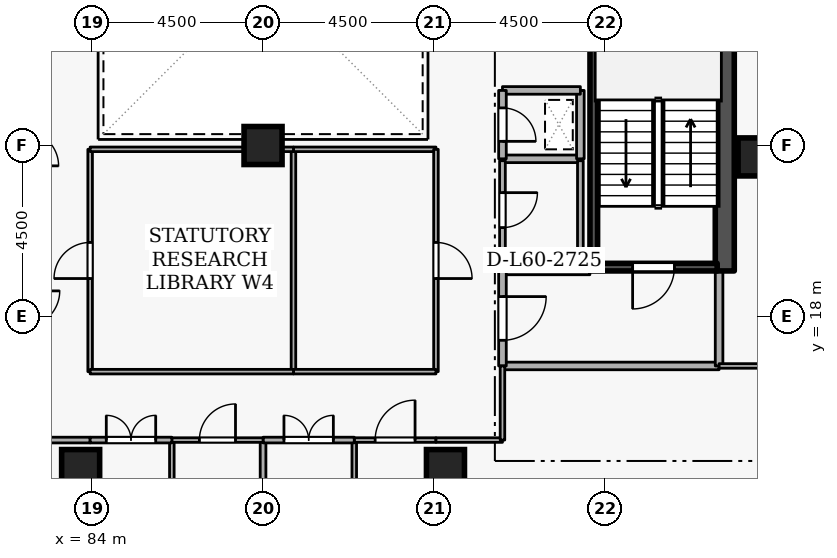
"""IFC4 building model, lengths in metres.
Left out: names, types, materials, properties, quantities, classifications, styles, units other than length and angle.
Written with IfcOpenShell. Run it as: python <this file> out.ifc"""

import sys

from ifc_helpers import new_model, si_unit, direction, frame, frame_2d, origin, origin_2d, place, context, subcontext, project, spatial, rectangle, extrude, element, fill, save


model = new_model("IFC4")
c1 = context("Model", 3, precision=1e-05, world=origin(), true_north=direction((0.0, 1.0)))
c2 = subcontext(c1, "Body", "Model", "MODEL_VIEW")
j1 = project(units=[si_unit("LENGTHUNIT", "METRE"), si_unit("PLANEANGLEUNIT", "RADIAN")], contexts=[c1])
p1 = place(None, origin())
s1 = spatial("IfcSite", under=j1, at=p1, CompositionType="ELEMENT")
p2 = place(p1, origin())
s2 = spatial("IfcBuilding", under=s1, at=p2, CompositionType="ELEMENT")
p3 = place(p2, frame((0.0, 0.0, 225.9)))
s3 = spatial("IfcBuildingStorey", under=s2, at=p3, CompositionType="ELEMENT", Elevation=225.9)
p4 = place(p3, frame((100.65, 19.2, 0.0), z_axis=(0.0, 0.0, 1.0), x_axis=(0.0, 1.0, 0.0)))
e1 = element("IfcWall", 1, at=p4, inside=s3, PredefinedType="SHEAR", context=c2, shape_type="SweptSolid", body=[
    extrude(rectangle(XDim=15.6, YDim=0.5, at=frame_2d((7.8, 0.0))), origin(), (0.0, 0.0, 1.0), 3.6),
])
for number, where, z_axis, x_axis in (
    (2, (93.3, 14.0, 0.0), (0.0, 0.0, 1.0), (1.0, 0.0, 0.0)),
    (3, (83.7, 14.0, 0.0), (0.0, 0.0, 1.0), (1.0, 0.0, 0.0)),
    (4, (101.5, 22.2, 0.0), (0.0, 0.0, 1.0), (1.0, 0.0, 0.0)),
    (5, (88.5, 22.5, 0.0), (0.0, 0.0, 1.0), (1.0, 0.0, 0.0)),
):
    element("IfcColumn", number, at=place(p3, frame(where, z_axis=z_axis, x_axis=x_axis)), inside=s3, PredefinedType="COLUMN", context=c2, shape_type="SweptSolid", body=[
        extrude(rectangle(XDim=1.0, YDim=1.0, at=origin_2d()), origin(), (0.0, 0.0, 1.0), 3.6),
    ])
p5 = place(p3, frame((100.45, 19.3, 0.0), z_axis=(0.0, 0.0, 1.0), x_axis=(-1.0, 0.0, 0.0)))
e6 = element("IfcWall", 6, at=p5, inside=s3, PredefinedType="SHEAR", context=c2, shape_type="SweptSolid", body=[
    extrude(rectangle(XDim=3.35, YDim=0.2, at=frame_2d((1.675, 0.0))), origin(), (0.0, 0.0, 1.0), 3.6),
])
p6 = place(p5, frame((1.125, 0.0, 0.0)))
e7 = element("IfcOpeningElement", 7, at=p6, cuts=e6, PredefinedType="OPENING", context=c2, shape_type="SweptSolid", body=[
    extrude(rectangle(XDim=1.1, YDim=2.1, at=frame_2d((0.55, 1.05))), frame((0.0, 0.11, 0.0), z_axis=(0.0, -1.0, 0.0), x_axis=(1.0, 0.0, 0.0)), (0.0, 0.0, 1.0), 0.22),
])
p7 = place(p3, frame((97.203, 26.55, 0.0), z_axis=(0.0, 0.0, 1.0), x_axis=(0.0, -1.0, 0.0)))
e8 = element("IfcWall", 8, at=p7, inside=s3, PredefinedType="SHEAR", context=c2, shape_type="SweptSolid", body=[
    extrude(rectangle(XDim=7.1, YDim=0.2, at=frame_2d((3.55, 0.0))), origin(), (0.0, 0.0, 1.0), 3.6),
])
p8 = place(p3, frame((94.8, 16.7, 0.0), z_axis=(0.0, 0.0, 1.0), x_axis=(1.0, 0.0, 0.0)))
e9 = element("IfcWall", 9, at=p8, inside=s3, PredefinedType="STANDARD", context=c2, shape_type="SweptSolid", body=[
    extrude(rectangle(XDim=5.7, YDim=0.2, at=frame_2d((2.85, 0.0))), origin(), (0.0, 0.0, 1.0), 3.3),
])
p9 = place(p3, frame((100.5, 16.7, 0.0), z_axis=(0.0, 0.0, 1.0), x_axis=(0.0, 1.0, 0.0)))
e10 = element("IfcWall", 10, at=p9, inside=s3, PredefinedType="STANDARD", context=c2, shape_type="SweptSolid", body=[
    extrude(rectangle(XDim=2.5, YDim=0.2, at=frame_2d((1.25, 0.0))), origin(), (0.0, 0.0, 1.0), 3.3),
])
p10 = place(p3, frame((97.1, 19.2, 0.0), z_axis=(0.0, 0.0, 1.0), x_axis=(-1.0, 0.0, 0.0)))
e11 = element("IfcWall", 11, at=p10, inside=s3, PredefinedType="STANDARD", context=c2, shape_type="SweptSolid", body=[
    extrude(rectangle(XDim=2.3, YDim=0.2, at=frame_2d((1.15, 0.0))), origin(), (0.0, 0.0, 1.0), 2.505),
])
p11 = place(p3, frame((94.8, 19.2, 0.0), z_axis=(0.0, 0.0, 1.0), x_axis=(0.0, -1.0, 0.0)))
e12 = element("IfcWall", 12, at=p11, inside=s3, PredefinedType="STANDARD", context=c2, shape_type="SweptSolid", body=[
    extrude(rectangle(XDim=2.5, YDim=0.2, at=frame_2d((1.25, 0.0))), origin(), (0.0, 0.0, 1.0), 3.3),
])
p12 = place(p11, frame((0.675, 0.0, 0.0)))
e13 = element("IfcOpeningElement", 13, at=p12, cuts=e12, PredefinedType="OPENING", context=c2, shape_type="SweptSolid", body=[
    extrude(rectangle(XDim=1.15, YDim=2.1, at=frame_2d((0.575, 1.05))), frame((0.0, 0.11, 0.0), z_axis=(0.0, -1.0, 0.0), x_axis=(1.0, 0.0, 0.0)), (0.0, 0.0, 1.0), 0.22),
])
p13 = place(p3, frame((94.8, 22.15, 0.0), z_axis=(0.0, 0.0, 1.0), x_axis=(1.0, 0.0, 0.0)))
e14 = element("IfcWall", 14, at=p13, inside=s3, PredefinedType="STANDARD", context=c2, shape_type="SweptSolid", body=[
    extrude(rectangle(XDim=2.05, YDim=0.2, at=frame_2d((1.025, 0.0))), origin(), (0.0, 0.0, 1.0), 3.3),
])
p14 = place(p3, frame((96.85, 22.15, 0.0), z_axis=(0.0, 0.0, 1.0), x_axis=(0.0, 1.0, 0.0)))
e15 = element("IfcWall", 15, at=p14, inside=s3, PredefinedType="STANDARD", context=c2, shape_type="SweptSolid", body=[
    extrude(rectangle(XDim=1.8, YDim=0.2, at=frame_2d((0.9, 0.0))), origin(), (0.0, 0.0, 1.0), 3.3),
])
p15 = place(p3, frame((96.85, 23.95, 0.0), z_axis=(0.0, 0.0, 1.0), x_axis=(-1.0, 0.0, 0.0)))
e16 = element("IfcWall", 16, at=p15, inside=s3, PredefinedType="STANDARD", context=c2, shape_type="SweptSolid", body=[
    extrude(rectangle(XDim=2.05, YDim=0.2, at=frame_2d((1.025, 0.0))), origin(), (0.0, 0.0, 1.0), 3.3),
])
p16 = place(p3, frame((94.8, 23.95, 0.0), z_axis=(0.0, 0.0, 1.0), x_axis=(0.0, -1.0, 0.0)))
e17 = element("IfcWall", 17, at=p16, inside=s3, PredefinedType="STANDARD", context=c2, shape_type="SweptSolid", body=[
    extrude(rectangle(XDim=1.8, YDim=0.2, at=frame_2d((0.9, 0.0))), origin(), (0.0, 0.0, 1.0), 3.3),
])
p17 = place(p16, frame((0.46, 0.0, 0.0)))
e18 = element("IfcOpeningElement", 18, at=p17, cuts=e17, PredefinedType="OPENING", context=c2, shape_type="SweptSolid", body=[
    extrude(rectangle(XDim=0.88, YDim=2.04, at=frame_2d((0.44, 1.02))), frame((0.0, 0.11, 0.0), z_axis=(0.0, -1.0, 0.0), x_axis=(1.0, 0.0, 0.0)), (0.0, 0.0, 1.0), 0.22),
])
p18 = place(p3, frame((94.8, 19.5, 0.0), z_axis=(0.0, 0.0, 1.0), x_axis=(1.0, 0.0, 0.0)))
e19 = element("IfcWall", 19, at=p18, inside=s3, PredefinedType="PARTITIONING", context=c2, shape_type="SweptSolid", body=[
    extrude(rectangle(XDim=2.05, YDim=0.15, at=frame_2d((1.025, 0.0))), origin(), (0.0, 0.0, 1.0), 2.505),
])
p19 = place(p3, frame((96.85, 19.5, 0.0), z_axis=(0.0, 0.0, 1.0), x_axis=(0.0, 1.0, 0.0)))
e20 = element("IfcWall", 20, at=p19, inside=s3, PredefinedType="PARTITIONING", context=c2, shape_type="SweptSolid", body=[
    extrude(rectangle(XDim=2.6, YDim=0.15, at=frame_2d((1.3, 0.0))), origin(), (0.0, 0.0, 1.0), 3.3),
])
p20 = place(p3, frame((94.8, 22.1, 0.0), z_axis=(0.0, 0.0, 1.0), x_axis=(0.0, -1.0, 0.0)))
e21 = element("IfcWall", 21, at=p20, inside=s3, PredefinedType="PARTITIONING", context=c2, shape_type="SweptSolid", body=[
    extrude(rectangle(XDim=2.6, YDim=0.15, at=frame_2d((1.3, 0.0))), origin(), (0.0, 0.0, 1.0), 3.3),
])
p21 = place(p20, frame((0.84, 0.0, 0.0)))
e22 = element("IfcOpeningElement", 22, at=p21, cuts=e21, PredefinedType="OPENING", context=c2, shape_type="SweptSolid", body=[
    extrude(rectangle(XDim=0.92, YDim=2.08, at=frame_2d((0.46, 1.04))), frame((0.0, 0.085, 0.0), z_axis=(0.0, -1.0, 0.0), x_axis=(1.0, 0.0, 0.0)), (0.0, 0.0, 1.0), 0.17),
])
p22 = place(p3, frame((90.9, 3.28, 0.0), z_axis=(0.0, 0.0, 1.0), x_axis=(0.0, 1.0, 0.0)))
e23 = element("IfcWall", 23, at=p22, inside=s3, PredefinedType="PARTITIONING", context=c2, shape_type="SweptSolid", body=[
    extrude(rectangle(XDim=11.47, YDim=0.12, at=frame_2d((5.735, 0.0))), origin(), (0.0, 0.0, 1.0), 3.3),
])
p23 = place(p3, frame((90.9, 14.75, 0.0), z_axis=(0.0, 0.0, 1.0), x_axis=(1.0, 0.0, 0.0)))
e24 = element("IfcWall", 24, at=p23, inside=s3, PredefinedType="PARTITIONING", context=c2, shape_type="SweptSolid", body=[
    extrude(rectangle(XDim=2.15, YDim=0.12, at=frame_2d((1.075, 0.0))), origin(), (0.0, 0.0, 1.0), 3.3),
])
p24 = place(p23, frame((0.55, 0.0, 0.0)))
e25 = element("IfcOpeningElement", 25, at=p24, cuts=e24, PredefinedType="OPENING", context=c2, shape_type="SweptSolid", body=[
    extrude(rectangle(XDim=1.05, YDim=2.1, at=frame_2d((0.525, 1.05))), frame((0.0, 0.07, 0.0), z_axis=(0.0, -1.0, 0.0), x_axis=(1.0, 0.0, 0.0)), (0.0, 0.0, 1.0), 0.14),
])
p25 = place(p3, frame((93.05, 14.75, 0.0), z_axis=(0.0, 0.0, 1.0), x_axis=(1.0, 0.0, 0.0)))
e26 = element("IfcWall", 26, at=p25, inside=s3, PredefinedType="PARTITIONING", context=c2, shape_type="SweptSolid", body=[
    extrude(rectangle(XDim=1.75, YDim=0.12, at=frame_2d((0.875, 0.0))), origin(), (0.0, 0.0, 1.0), 3.3),
])
p26 = place(p3, frame((94.8, 14.75, 0.0), z_axis=(0.0, 0.0, 1.0), x_axis=(0.0, 1.0, 0.0)))
e27 = element("IfcWall", 27, at=p26, inside=s3, PredefinedType="PARTITIONING", context=c2, shape_type="SweptSolid", body=[
    extrude(rectangle(XDim=1.95, YDim=0.12, at=frame_2d((0.975, 0.0))), origin(), (0.0, 0.0, 1.0), 3.3),
])
p27 = place(p3, frame((100.5, 16.7, 0.0), z_axis=(0.0, 0.0, 1.0), x_axis=(1.0, 0.0, 0.0)))
e28 = element("IfcWall", 28, at=p27, inside=s3, PredefinedType="PARTITIONING", context=c2, shape_type="SweptSolid", body=[
    extrude(rectangle(XDim=5.72, YDim=0.12, at=frame_2d((2.86, 0.0))), origin(), (0.0, 0.0, 1.0), 3.3),
])
p28 = place(p3, frame((88.5, 7.329, 0.0), z_axis=(0.0, 0.0, 1.0), x_axis=(0.0, 1.0, 0.0)))
e29 = element("IfcWall", 29, at=p28, inside=s3, PredefinedType="PARTITIONING", context=c2, shape_type="SweptSolid", body=[
    extrude(rectangle(XDim=7.421, YDim=0.15, at=frame_2d((3.711, 0.0))), origin(), (0.0, 0.0, 1.0), 1.785),
])
p29 = place(p3, frame((88.5, 14.75, 0.0), z_axis=(0.0, 0.0, 1.0), x_axis=(1.0, 0.0, 0.0)))
e30 = element("IfcWall", 30, at=p29, inside=s3, PredefinedType="PARTITIONING", context=c2, shape_type="SweptSolid", body=[
    extrude(rectangle(XDim=2.4, YDim=0.15, at=frame_2d((1.2, 0.0))), origin(), (0.0, 0.0, 1.0), 3.3),
])
p30 = place(p29, frame((0.55, 0.0, 0.0)))
e31 = element("IfcOpeningElement", 31, at=p30, cuts=e30, PredefinedType="OPENING", context=c2, shape_type="SweptSolid", body=[
    extrude(rectangle(XDim=1.3, YDim=2.12, at=frame_2d((0.65, 1.06))), frame((0.0, 0.085, 0.0), z_axis=(0.0, -1.0, 0.0), x_axis=(1.0, 0.0, 0.0)), (0.0, 0.0, 1.0), 0.17),
])
p31 = place(p3, frame((86.1, 3.28, 0.0), z_axis=(0.0, 0.0, 1.0), x_axis=(0.0, 1.0, 0.0)))
e32 = element("IfcWall", 32, at=p31, inside=s3, PredefinedType="PARTITIONING", context=c2, shape_type="SweptSolid", body=[
    extrude(rectangle(XDim=11.47, YDim=0.12, at=frame_2d((5.735, 0.0))), origin(), (0.0, 0.0, 1.0), 3.3),
])
p32 = place(p3, frame((86.1, 14.75, 0.0), z_axis=(0.0, 0.0, 1.0), x_axis=(1.0, 0.0, 0.0)))
e33 = element("IfcWall", 33, at=p32, inside=s3, PredefinedType="PARTITIONING", context=c2, shape_type="SweptSolid", body=[
    extrude(rectangle(XDim=2.4, YDim=0.12, at=frame_2d((1.2, 0.0))), origin(), (0.0, 0.0, 1.0), 3.3),
])
p33 = place(p32, frame((0.725, 0.0, 0.0)))
e34 = element("IfcOpeningElement", 34, at=p33, cuts=e33, PredefinedType="OPENING", context=c2, shape_type="SweptSolid", body=[
    extrude(rectangle(XDim=0.95, YDim=2.1, at=frame_2d((0.475, 1.05))), frame((0.0, 0.07, 0.0), z_axis=(0.0, -1.0, 0.0), x_axis=(1.0, 0.0, 0.0)), (0.0, 0.0, 1.0), 0.14),
])
p34 = place(p3, frame((82.2, 14.75, 0.0), z_axis=(0.0, 0.0, 1.0), x_axis=(1.0, 0.0, 0.0)))
e35 = element("IfcWall", 35, at=p34, inside=s3, PredefinedType="PARTITIONING", context=c2, shape_type="SweptSolid", body=[
    extrude(rectangle(XDim=1.75, YDim=0.15, at=frame_2d((0.875, 0.0))), origin(), (0.0, 0.0, 1.0), 3.3),
])
p35 = place(p3, frame((83.95, 14.75, 0.0), z_axis=(0.0, 0.0, 1.0), x_axis=(1.0, 0.0, 0.0)))
e36 = element("IfcWall", 36, at=p35, inside=s3, PredefinedType="PARTITIONING", context=c2, shape_type="SweptSolid", body=[
    extrude(rectangle(XDim=2.15, YDim=0.15, at=frame_2d((1.075, 0.0))), origin(), (0.0, 0.0, 1.0), 3.3),
])
p36 = place(p35, frame((0.425, 0.0, 0.0)))
e37 = element("IfcOpeningElement", 37, at=p36, cuts=e36, PredefinedType="OPENING", context=c2, shape_type="SweptSolid", body=[
    extrude(rectangle(XDim=1.3, YDim=2.12, at=frame_2d((0.65, 1.06))), frame((0.0, 0.085, 0.0), z_axis=(0.0, -1.0, 0.0), x_axis=(1.0, 0.0, 0.0)), (0.0, 0.0, 1.0), 0.17),
])
p37 = place(p3, frame((89.3, 16.55, 0.0), z_axis=(0.0, 0.0, 1.0), x_axis=(0.0, 1.0, 0.0)))
e38 = element("IfcWall", 38, at=p37, inside=s3, PredefinedType="PARTITIONING", context=c2, shape_type="SweptSolid", body=[
    extrude(rectangle(XDim=5.85, YDim=0.12, at=frame_2d((2.925, 0.0))), origin(), (0.0, 0.0, 1.0), 3.3),
])
p38 = place(p3, frame((89.3, 22.4, 0.0), z_axis=(0.0, 0.0, 1.0), x_axis=(1.0, 0.0, 0.0)))
e39 = element("IfcWall", 39, at=p38, inside=s3, PredefinedType="PARTITIONING", context=c2, shape_type="SweptSolid", body=[
    extrude(rectangle(XDim=3.75, YDim=0.12, at=frame_2d((1.875, 0.0))), origin(), (0.0, 0.0, 1.0), 3.3),
])
p39 = place(p3, frame((93.05, 22.4, 0.0), z_axis=(0.0, 0.0, 1.0), x_axis=(0.0, -1.0, 0.0)))
e40 = element("IfcWall", 40, at=p39, inside=s3, PredefinedType="PARTITIONING", context=c2, shape_type="SweptSolid", body=[
    extrude(rectangle(XDim=5.85, YDim=0.12, at=frame_2d((2.925, 0.0))), origin(), (0.0, 0.0, 1.0), 3.3),
])
p40 = place(p39, frame((2.45, 0.0, 0.0)))
e41 = element("IfcOpeningElement", 41, at=p40, cuts=e40, PredefinedType="OPENING", context=c2, shape_type="SweptSolid", body=[
    extrude(rectangle(XDim=0.95, YDim=2.1, at=frame_2d((0.475, 1.05))), frame((0.0, 0.07, 0.0), z_axis=(0.0, -1.0, 0.0), x_axis=(1.0, 0.0, 0.0)), (0.0, 0.0, 1.0), 0.14),
])
p41 = place(p3, frame((93.05, 16.55, 0.0), z_axis=(0.0, 0.0, 1.0), x_axis=(-1.0, 0.0, 0.0)))
e42 = element("IfcWall", 42, at=p41, inside=s3, PredefinedType="PARTITIONING", context=c2, shape_type="SweptSolid", body=[
    extrude(rectangle(XDim=3.75, YDim=0.12, at=frame_2d((1.875, 0.0))), origin(), (0.0, 0.0, 1.0), 3.3),
])
p42 = place(p3, frame((83.95, 16.55, 0.0), z_axis=(0.0, 0.0, 1.0), x_axis=(0.0, 1.0, 0.0)))
e43 = element("IfcWall", 43, at=p42, inside=s3, PredefinedType="PARTITIONING", context=c2, shape_type="SweptSolid", body=[
    extrude(rectangle(XDim=5.85, YDim=0.12, at=frame_2d((2.925, 0.0))), origin(), (0.0, 0.0, 1.0), 3.3),
])
p43 = place(p42, frame((2.45, 0.0, 0.0)))
e44 = element("IfcOpeningElement", 44, at=p43, cuts=e43, PredefinedType="OPENING", context=c2, shape_type="SweptSolid", body=[
    extrude(rectangle(XDim=0.95, YDim=2.1, at=frame_2d((0.475, 1.05))), frame((0.0, 0.07, 0.0), z_axis=(0.0, -1.0, 0.0), x_axis=(1.0, 0.0, 0.0)), (0.0, 0.0, 1.0), 0.14),
])
for number, where, z_axis, x_axis in (
    (45, (83.95, 22.4, 0.0), (0.0, 0.0, 1.0), (1.0, 0.0, 0.0)),
    (46, (89.3, 16.55, 0.0), (0.0, 0.0, 1.0), (-1.0, 0.0, 0.0)),
):
    element("IfcWall", number, at=place(p3, frame(where, z_axis=z_axis, x_axis=x_axis)), inside=s3, PredefinedType="PARTITIONING", context=c2, shape_type="SweptSolid", body=[
        extrude(rectangle(XDim=5.35, YDim=0.12, at=frame_2d((2.675, 0.0))), origin(), (0.0, 0.0, 1.0), 3.3),
    ])
p44 = place(p6, origin())
e47 = element("IfcDoor", 47, at=p44, inside=s3, OperationType="SINGLE_SWING_RIGHT", PredefinedType="DOOR", context=c2, shape_type="SweptSolid", body=[
    extrude(rectangle(XDim=1.1, YDim=2.1, at=frame_2d((0.55, 1.05))), frame((0.0, 0.025, 0.0), z_axis=(0.0, -1.0, 0.0), x_axis=(1.0, 0.0, 0.0)), (0.0, 0.0, 1.0), 0.05),
])
fill(e7, e47)
p45 = place(p12, origin())
e48 = element("IfcDoor", 48, at=p45, inside=s3, OperationType="SINGLE_SWING_LEFT", PredefinedType="DOOR", context=c2, shape_type="SweptSolid", body=[
    extrude(rectangle(XDim=1.15, YDim=2.1, at=frame_2d((0.575, 1.05))), frame((0.0, 0.025, 0.0), z_axis=(0.0, -1.0, 0.0), x_axis=(1.0, 0.0, 0.0)), (0.0, 0.0, 1.0), 0.05),
])
fill(e13, e48)
p46 = place(p17, origin())
e49 = element("IfcDoor", 49, at=p46, inside=s3, OperationType="SINGLE_SWING_RIGHT", PredefinedType="DOOR", context=c2, shape_type="SweptSolid", body=[
    extrude(rectangle(XDim=0.88, YDim=2.04, at=frame_2d((0.44, 1.02))), frame((0.0, 0.025, 0.0), z_axis=(0.0, -1.0, 0.0), x_axis=(1.0, 0.0, 0.0)), (0.0, 0.0, 1.0), 0.05),
])
fill(e18, e49)
p47 = place(p21, origin())
e50 = element("IfcDoor", 50, at=p47, inside=s3, OperationType="SINGLE_SWING_LEFT", PredefinedType="DOOR", context=c2, shape_type="SweptSolid", body=[
    extrude(rectangle(XDim=0.92, YDim=2.08, at=frame_2d((0.46, 1.04))), frame((0.0, 0.025, 0.0), z_axis=(0.0, -1.0, 0.0), x_axis=(1.0, 0.0, 0.0)), (0.0, 0.0, 1.0), 0.05),
])
fill(e22, e50)
p48 = place(p24, origin())
e51 = element("IfcDoor", 51, at=p48, inside=s3, OperationType="SINGLE_SWING_RIGHT", PredefinedType="DOOR", context=c2, shape_type="SweptSolid", body=[
    extrude(rectangle(XDim=1.05, YDim=2.1, at=frame_2d((0.525, 1.05))), frame((0.0, 0.025, 0.0), z_axis=(0.0, -1.0, 0.0), x_axis=(1.0, 0.0, 0.0)), (0.0, 0.0, 1.0), 0.05),
])
fill(e25, e51)
p49 = place(p30, origin())
e52 = element("IfcDoor", 52, at=p49, inside=s3, OperationType="DOUBLE_DOOR_SINGLE_SWING", PredefinedType="DOOR", context=c2, shape_type="SweptSolid", body=[
    extrude(rectangle(XDim=1.3, YDim=2.12, at=frame_2d((0.65, 1.06))), frame((0.0, 0.025, 0.0), z_axis=(0.0, -1.0, 0.0), x_axis=(1.0, 0.0, 0.0)), (0.0, 0.0, 1.0), 0.05),
])
fill(e31, e52)
p50 = place(p33, origin())
e53 = element("IfcDoor", 53, at=p50, inside=s3, OperationType="SINGLE_SWING_RIGHT", PredefinedType="DOOR", context=c2, shape_type="SweptSolid", body=[
    extrude(rectangle(XDim=0.95, YDim=2.1, at=frame_2d((0.475, 1.05))), frame((0.0, 0.025, 0.0), z_axis=(0.0, -1.0, 0.0), x_axis=(1.0, 0.0, 0.0)), (0.0, 0.0, 1.0), 0.05),
])
fill(e34, e53)
p51 = place(p36, origin())
e54 = element("IfcDoor", 54, at=p51, inside=s3, OperationType="DOUBLE_DOOR_SINGLE_SWING", PredefinedType="DOOR", context=c2, shape_type="SweptSolid", body=[
    extrude(rectangle(XDim=1.3, YDim=2.12, at=frame_2d((0.65, 1.06))), frame((0.0, 0.025, 0.0), z_axis=(0.0, -1.0, 0.0), x_axis=(1.0, 0.0, 0.0)), (0.0, 0.0, 1.0), 0.05),
])
fill(e37, e54)
p52 = place(p40, origin())
e55 = element("IfcDoor", 55, at=p52, inside=s3, OperationType="SINGLE_SWING_RIGHT", PredefinedType="DOOR", context=c2, shape_type="SweptSolid", body=[
    extrude(rectangle(XDim=0.95, YDim=2.1, at=frame_2d((0.475, 1.05))), frame((0.0, 0.025, 0.0), z_axis=(0.0, -1.0, 0.0), x_axis=(1.0, 0.0, 0.0)), (0.0, 0.0, 1.0), 0.05),
])
fill(e41, e55)
p53 = place(p43, origin())
e56 = element("IfcDoor", 56, at=p53, inside=s3, OperationType="SINGLE_SWING_LEFT", PredefinedType="DOOR", context=c2, shape_type="SweptSolid", body=[
    extrude(rectangle(XDim=0.95, YDim=2.1, at=frame_2d((0.475, 1.05))), frame((0.0, 0.025, 0.0), z_axis=(0.0, -1.0, 0.0), x_axis=(1.0, 0.0, 0.0)), (0.0, 0.0, 1.0), 0.05),
])
fill(e44, e56)
save(model, sys.argv[1])
